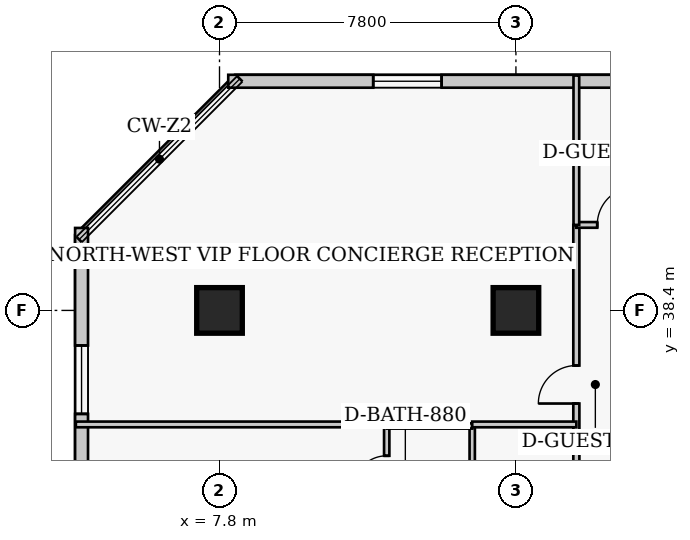
"""IFC4 building model, lengths in metres.
Left out: names, types, materials, properties, quantities, classifications, styles, units other than length and angle.
Written with IfcOpenShell. Run it as: python <this file> out.ifc"""

import sys

from ifc_helpers import new_model, si_unit, direction, frame, frame_2d, origin, origin_2d, place, context, subcontext, project, spatial, rectangle, extrude, element, fill, save


model = new_model("IFC4")
c1 = context("Model", 3, precision=1e-05, world=origin(), true_north=direction((0.0, 1.0)))
c2 = subcontext(c1, "Body", "Model", "MODEL_VIEW")
j1 = project(units=[si_unit("LENGTHUNIT", "METRE"), si_unit("PLANEANGLEUNIT", "RADIAN")], contexts=[c1])
p1 = place(None, origin())
s1 = spatial("IfcSite", under=j1, at=p1, CompositionType="ELEMENT")
p2 = place(p1, origin())
s2 = spatial("IfcBuilding", under=s1, at=p2, CompositionType="ELEMENT")
p3 = place(p2, frame((0.0, 0.0, 99.4)))
s3 = spatial("IfcBuildingStorey", under=s2, at=p3, CompositionType="ELEMENT", Elevation=99.4)
for number, where, z_axis, x_axis in (
    (1, (7.8, 38.4, 0.0), (0.0, 0.0, 1.0), (1.0, 0.0, 0.0)),
    (2, (15.6, 38.4, 0.0), (0.0, 0.0, 1.0), (1.0, 0.0, 0.0)),
):
    element("IfcColumn", number, at=place(p3, frame(where, z_axis=z_axis, x_axis=x_axis)), inside=s3, PredefinedType="COLUMN", context=c2, shape_type="SweptSolid", body=[
        extrude(rectangle(XDim=1.2, YDim=1.2, at=origin_2d()), origin(), (0.0, 0.0, 1.0), 3.8),
    ])
p4 = place(p3, frame((36.32, 44.43, 0.0), z_axis=(0.0, 0.0, 1.0), x_axis=(-1.0, 0.0, 0.0)))
e3 = element("IfcWall", 3, at=p4, inside=s3, PredefinedType="SOLIDWALL", context=c2, shape_type="SweptSolid", body=[
    extrude(rectangle(XDim=28.29, YDim=0.34, at=frame_2d((14.145, 0.0))), origin(), (0.0, 0.0, 1.0), 3.54),
])
p5 = place(p4, frame((3.815, 0.0, 0.85)))
e4 = element("IfcOpeningElement", 4, at=p5, cuts=e3, PredefinedType="OPENING", context=c2, shape_type="SweptSolid", body=[
    extrude(rectangle(XDim=1.8, YDim=1.8, at=frame_2d((0.9, 0.9))), frame((0.0, 0.18, 0.0), z_axis=(0.0, -1.0, 0.0), x_axis=(1.0, 0.0, 0.0)), (0.0, 0.0, 1.0), 0.36),
])
p6 = place(p4, frame((13.245, 0.0, 0.85)))
e5 = element("IfcOpeningElement", 5, at=p6, cuts=e3, PredefinedType="OPENING", context=c2, shape_type="SweptSolid", body=[
    extrude(rectangle(XDim=1.8, YDim=1.8, at=frame_2d((0.9, 0.9))), frame((0.0, 0.18, 0.0), z_axis=(0.0, -1.0, 0.0), x_axis=(1.0, 0.0, 0.0)), (0.0, 0.0, 1.0), 0.36),
])
p7 = place(p4, frame((22.675, 0.0, 0.85)))
e6 = element("IfcOpeningElement", 6, at=p7, cuts=e3, PredefinedType="OPENING", context=c2, shape_type="SweptSolid", body=[
    extrude(rectangle(XDim=1.8, YDim=1.8, at=frame_2d((0.9, 0.9))), frame((0.0, 0.18, 0.0), z_axis=(0.0, -1.0, 0.0), x_axis=(1.0, 0.0, 0.0)), (0.0, 0.0, 1.0), 0.36),
])
p8 = place(p3, frame((4.17, 40.57, 0.0), z_axis=(0.0, 0.0, 1.0), x_axis=(0.0, -1.0, 0.0)))
e7 = element("IfcWall", 7, at=p8, inside=s3, PredefinedType="SOLIDWALL", context=c2, shape_type="SweptSolid", body=[
    extrude(rectangle(XDim=31.94, YDim=0.34, at=frame_2d((15.97, 0.0))), origin(), (0.0, 0.0, 1.0), 3.54),
])
p9 = place(p8, frame((3.093, 0.0, 0.85)))
e8 = element("IfcOpeningElement", 8, at=p9, cuts=e7, PredefinedType="OPENING", context=c2, shape_type="SweptSolid", body=[
    extrude(rectangle(XDim=1.8, YDim=1.8, at=frame_2d((0.9, 0.9))), frame((0.0, 0.18, 0.0), z_axis=(0.0, -1.0, 0.0), x_axis=(1.0, 0.0, 0.0)), (0.0, 0.0, 1.0), 0.36),
])
p10 = place(p8, frame((12.228, 0.0, 0.85)))
e9 = element("IfcOpeningElement", 9, at=p10, cuts=e7, PredefinedType="OPENING", context=c2, shape_type="SweptSolid", body=[
    extrude(rectangle(XDim=1.8, YDim=1.8, at=frame_2d((0.9, 0.9))), frame((0.0, 0.18, 0.0), z_axis=(0.0, -1.0, 0.0), x_axis=(1.0, 0.0, 0.0)), (0.0, 0.0, 1.0), 0.36),
])
p11 = place(p8, frame((18.413, 0.0, 0.85)))
e10 = element("IfcOpeningElement", 10, at=p11, cuts=e7, PredefinedType="OPENING", context=c2, shape_type="SweptSolid", body=[
    extrude(rectangle(XDim=1.8, YDim=1.8, at=frame_2d((0.9, 0.9))), frame((0.0, 0.18, 0.0), z_axis=(0.0, -1.0, 0.0), x_axis=(1.0, 0.0, 0.0)), (0.0, 0.0, 1.0), 0.36),
])
p12 = place(p8, frame((27.048, 0.0, 0.85)))
e11 = element("IfcOpeningElement", 11, at=p12, cuts=e7, PredefinedType="OPENING", context=c2, shape_type="SweptSolid", body=[
    extrude(rectangle(XDim=1.8, YDim=1.8, at=frame_2d((0.9, 0.9))), frame((0.0, 0.18, 0.0), z_axis=(0.0, -1.0, 0.0), x_axis=(1.0, 0.0, 0.0)), (0.0, 0.0, 1.0), 0.36),
])
p13 = place(p8, frame((7.81, 0.0, 0.85)))
e12 = element("IfcOpeningElement", 12, at=p13, cuts=e7, PredefinedType="OPENING", context=c2, shape_type="SweptSolid", body=[
    extrude(rectangle(XDim=1.3, YDim=1.7, at=frame_2d((0.65, 0.85))), frame((0.0, 0.18, 0.0), z_axis=(0.0, -1.0, 0.0), x_axis=(1.0, 0.0, 0.0)), (0.0, 0.0, 1.0), 0.36),
])
p14 = place(p3, frame((17.19, 6.65, 0.0), z_axis=(0.0, 0.0, 1.0), x_axis=(0.0, 1.0, 0.0)))
e13 = element("IfcWall", 13, at=p14, inside=s3, PredefinedType="PARTITIONING", context=c2, shape_type="SweptSolid", body=[
    extrude(rectangle(XDim=34.0, YDim=0.16, at=frame_2d((17.0, 0.0))), origin(), (0.0, 0.0, 1.0), 3.54),
])
p15 = place(p14, frame((1.8, 0.0, 0.0)))
e14 = element("IfcOpeningElement", 14, at=p15, cuts=e13, PredefinedType="OPENING", context=c2, shape_type="SweptSolid", body=[
    extrude(rectangle(XDim=0.95, YDim=2.1, at=frame_2d((0.475, 1.05))), frame((0.0, 0.09, 0.0), z_axis=(0.0, -1.0, 0.0), x_axis=(1.0, 0.0, 0.0)), (0.0, 0.0, 1.0), 0.18),
])
p16 = place(p14, frame((8.475, 0.0, 0.0)))
e15 = element("IfcOpeningElement", 15, at=p16, cuts=e13, PredefinedType="OPENING", context=c2, shape_type="SweptSolid", body=[
    extrude(rectangle(XDim=0.95, YDim=2.1, at=frame_2d((0.475, 1.05))), frame((0.0, 0.09, 0.0), z_axis=(0.0, -1.0, 0.0), x_axis=(1.0, 0.0, 0.0)), (0.0, 0.0, 1.0), 0.18),
])
p17 = place(p14, frame((17.275, 0.0, 0.0)))
e16 = element("IfcOpeningElement", 16, at=p17, cuts=e13, PredefinedType="OPENING", context=c2, shape_type="SweptSolid", body=[
    extrude(rectangle(XDim=0.95, YDim=2.1, at=frame_2d((0.475, 1.05))), frame((0.0, 0.09, 0.0), z_axis=(0.0, -1.0, 0.0), x_axis=(1.0, 0.0, 0.0)), (0.0, 0.0, 1.0), 0.18),
])
p18 = place(p14, frame((24.975, 0.0, 0.0)))
e17 = element("IfcOpeningElement", 17, at=p18, cuts=e13, PredefinedType="OPENING", context=c2, shape_type="SweptSolid", body=[
    extrude(rectangle(XDim=0.95, YDim=2.1, at=frame_2d((0.475, 1.05))), frame((0.0, 0.09, 0.0), z_axis=(0.0, -1.0, 0.0), x_axis=(1.0, 0.0, 0.0)), (0.0, 0.0, 1.0), 0.18),
])
p19 = place(p14, frame((29.3, 0.0, 0.0)))
e18 = element("IfcOpeningElement", 18, at=p19, cuts=e13, PredefinedType="OPENING", context=c2, shape_type="SweptSolid", body=[
    extrude(rectangle(XDim=1.0, YDim=2.15, at=frame_2d((0.5, 1.075))), frame((0.0, 0.09, 0.0), z_axis=(0.0, -1.0, 0.0), x_axis=(1.0, 0.0, 0.0)), (0.0, 0.0, 1.0), 0.18),
])
p20 = place(p3, frame((17.19, 40.65, 0.0), z_axis=(0.0, 0.0, 1.0), x_axis=(1.0, 0.0, 0.0)))
e19 = element("IfcWall", 19, at=p20, inside=s3, PredefinedType="PARTITIONING", context=c2, shape_type="SweptSolid", body=[
    extrude(rectangle(XDim=4.91, YDim=0.15, at=frame_2d((2.455, 0.0))), origin(), (0.0, 0.0, 1.0), 3.54),
])
p21 = place(p20, frame((0.55, 0.0, 0.0)))
e20 = element("IfcOpeningElement", 20, at=p21, cuts=e19, PredefinedType="OPENING", context=c2, shape_type="SweptSolid", body=[
    extrude(rectangle(XDim=1.0, YDim=2.15, at=frame_2d((0.5, 1.075))), frame((0.0, 0.085, 0.0), z_axis=(0.0, -1.0, 0.0), x_axis=(1.0, 0.0, 0.0)), (0.0, 0.0, 1.0), 0.17),
])
p22 = place(p3, frame((17.19, 40.65, 0.0), z_axis=(0.0, 0.0, 1.0), x_axis=(0.0, 1.0, 0.0)))
e21 = element("IfcWall", 21, at=p22, inside=s3, PredefinedType="PARTITIONING", context=c2, shape_type="SweptSolid", body=[
    extrude(rectangle(XDim=3.93, YDim=0.15, at=frame_2d((1.965, 0.0))), origin(), (0.0, 0.0, 1.0), 3.54),
])
p23 = place(p3, frame((12.2, 32.91, 0.0), z_axis=(0.0, 0.0, 1.0), x_axis=(0.0, 1.0, 0.0)))
e22 = element("IfcWall", 22, at=p23, inside=s3, PredefinedType="PLUMBINGWALL", context=c2, shape_type="SweptSolid", body=[
    extrude(rectangle(XDim=2.45, YDim=0.14, at=frame_2d((1.225, 0.0))), origin(), (0.0, 0.0, 1.0), 3.54),
])
p24 = place(p23, frame((0.785, 0.0, 0.0)))
e23 = element("IfcOpeningElement", 23, at=p24, cuts=e22, PredefinedType="OPENING", context=c2, shape_type="SweptSolid", body=[
    extrude(rectangle(XDim=0.88, YDim=2.05, at=frame_2d((0.44, 1.025))), frame((0.0, 0.08, 0.0), z_axis=(0.0, -1.0, 0.0), x_axis=(1.0, 0.0, 0.0)), (0.0, 0.0, 1.0), 0.16),
])
p25 = place(p3, frame((14.45, 32.91, 0.0), z_axis=(0.0, 0.0, 1.0), x_axis=(0.0, 1.0, 0.0)))
e24 = element("IfcWall", 24, at=p25, inside=s3, PredefinedType="PLUMBINGWALL", context=c2, shape_type="SweptSolid", body=[
    extrude(rectangle(XDim=2.45, YDim=0.14, at=frame_2d((1.225, 0.0))), origin(), (0.0, 0.0, 1.0), 3.54),
])
p26 = place(p3, frame((12.2, 35.36, 0.0), z_axis=(0.0, 0.0, 1.0), x_axis=(1.0, 0.0, 0.0)))
e25 = element("IfcWall", 25, at=p26, inside=s3, PredefinedType="PLUMBINGWALL", context=c2, shape_type="SweptSolid", body=[
    extrude(rectangle(XDim=2.25, YDim=0.14, at=frame_2d((1.125, 0.0))), origin(), (0.0, 0.0, 1.0), 3.54),
])
p27 = place(p3, frame((4.02, 35.4, 0.0), z_axis=(0.0, 0.0, 1.0), x_axis=(1.0, 0.0, 0.0)))
e26 = element("IfcWall", 26, at=p27, inside=s3, PredefinedType="PARTITIONING", context=c2, shape_type="SweptSolid", body=[
    extrude(rectangle(XDim=8.18, YDim=0.15, at=frame_2d((4.09, 0.0))), origin(), (0.0, 0.0, 1.0), 3.54),
])
p28 = place(p3, frame((14.45, 35.4, 0.0), z_axis=(0.0, 0.0, 1.0), x_axis=(1.0, 0.0, 0.0)))
e27 = element("IfcWall", 27, at=p28, inside=s3, PredefinedType="PARTITIONING", context=c2, shape_type="SweptSolid", body=[
    extrude(rectangle(XDim=2.74, YDim=0.15, at=frame_2d((1.37, 0.0))), origin(), (0.0, 0.0, 1.0), 3.54),
])
p29 = place(p7, origin())
e28 = element("IfcWindow", 28, at=p29, inside=s3, PartitioningType="SINGLE_PANEL", PredefinedType="WINDOW", context=c2, shape_type="SweptSolid", body=[
    extrude(rectangle(XDim=1.8, YDim=1.8, at=frame_2d((0.9, 0.9))), frame((0.0, 0.03, 0.0), z_axis=(0.0, -1.0, 0.0), x_axis=(1.0, 0.0, 0.0)), (0.0, 0.0, 1.0), 0.06),
])
fill(e6, e28)
p30 = place(p9, origin())
e29 = element("IfcWindow", 29, at=p30, inside=s3, PartitioningType="SINGLE_PANEL", PredefinedType="WINDOW", context=c2, shape_type="SweptSolid", body=[
    extrude(rectangle(XDim=1.8, YDim=1.8, at=frame_2d((0.9, 0.9))), frame((0.0, 0.03, 0.0), z_axis=(0.0, -1.0, 0.0), x_axis=(1.0, 0.0, 0.0)), (0.0, 0.0, 1.0), 0.06),
])
fill(e8, e29)
p31 = place(p21, origin())
e30 = element("IfcDoor", 30, at=p31, inside=s3, OperationType="SINGLE_SWING_RIGHT", PredefinedType="DOOR", context=c2, shape_type="SweptSolid", body=[
    extrude(rectangle(XDim=1.0, YDim=2.15, at=frame_2d((0.5, 1.075))), frame((0.0, 0.025, 0.0), z_axis=(0.0, -1.0, 0.0), x_axis=(1.0, 0.0, 0.0)), (0.0, 0.0, 1.0), 0.05),
])
fill(e20, e30)
p32 = place(p24, origin())
e31 = element("IfcDoor", 31, at=p32, inside=s3, OperationType="SINGLE_SWING_LEFT", PredefinedType="DOOR", context=c2, shape_type="SweptSolid", body=[
    extrude(rectangle(XDim=0.88, YDim=2.05, at=frame_2d((0.44, 1.025))), frame((0.0, 0.025, 0.0), z_axis=(0.0, -1.0, 0.0), x_axis=(1.0, 0.0, 0.0)), (0.0, 0.0, 1.0), 0.05),
])
fill(e23, e31)
p33 = place(p19, origin())
e32 = element("IfcDoor", 32, at=p33, inside=s3, OperationType="SINGLE_SWING_LEFT", PredefinedType="DOOR", context=c2, shape_type="SweptSolid", body=[
    extrude(rectangle(XDim=1.0, YDim=2.15, at=frame_2d((0.5, 1.075))), frame((0.0, 0.025, 0.0), z_axis=(0.0, -1.0, 0.0), x_axis=(1.0, 0.0, 0.0)), (0.0, 0.0, 1.0), 0.05),
])
fill(e18, e32)
save(model, sys.argv[1])
